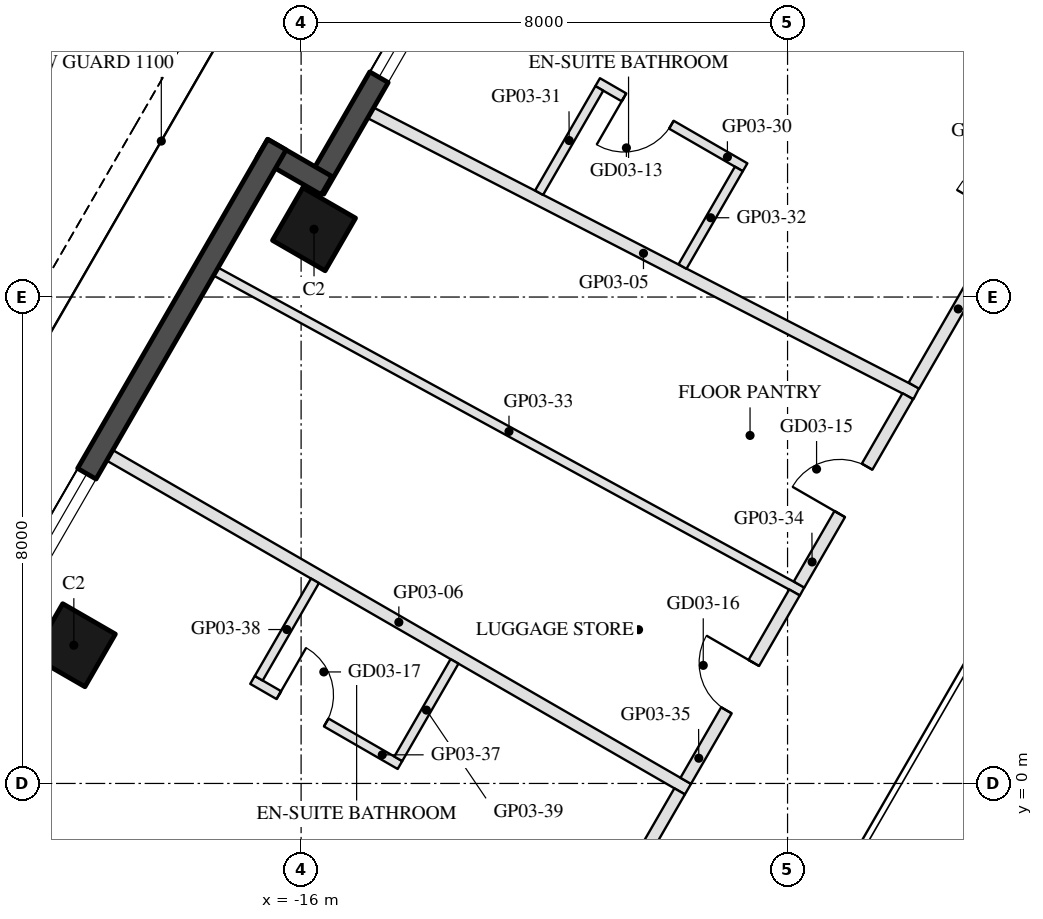
"""IFC4 building model, lengths in metres.
Left out: names, types, materials, properties, quantities, classifications, styles, units other than length and angle.
Written with IfcOpenShell. Run it as: python <this file> out.ifc"""

import sys

from ifc_helpers import new_model, si_unit, direction, frame, frame_2d, origin, origin_2d, place, context, subcontext, project, spatial, rectangle, hollow_rectangle, extrude, element, fill, save


model = new_model("IFC4")
c1 = context("Model", 3, precision=1e-05, world=origin(), true_north=direction((0.0, 1.0)))
c2 = subcontext(c1, "Body", "Model", "MODEL_VIEW")
j1 = project(units=[si_unit("LENGTHUNIT", "METRE"), si_unit("PLANEANGLEUNIT", "RADIAN")], contexts=[c1])
p1 = place(None, origin())
s1 = spatial("IfcSite", under=j1, at=p1, CompositionType="ELEMENT")
p2 = place(p1, origin())
s2 = spatial("IfcBuilding", under=s1, at=p2, CompositionType="ELEMENT")
p3 = place(p2, frame((0.0, 0.0, 65.0)))
s3 = spatial("IfcBuildingStorey", under=s2, at=p3, CompositionType="ELEMENT", Elevation=65.0)
for number, where, z_axis, x_axis in (
    (1, (-15.788, 9.115, 0.0), (0.0, 0.0, 1.0), (0.5, 0.866, 0.0)),
    (2, (-19.738, 2.273, 0.0), (0.0, 0.0, 1.0), (0.5, 0.866, 0.0)),
):
    element("IfcColumn", number, at=place(p3, frame(where, z_axis=z_axis, x_axis=x_axis)), inside=s3, PredefinedType="COLUMN", context=c2, shape_type="SweptSolid", body=[
        extrude(hollow_rectangle(XDim=1.0, YDim=1.0, WallThickness=0.045, at=origin_2d()), origin(), (0.0, 0.0, 1.0), 3.7),
    ])
p4 = place(p3, frame((-12.409, 15.617, 0.0), z_axis=(0.0, 0.0, 1.0), x_axis=(-0.500003597184, -0.866023326939, 0.0)))
e3 = element("IfcWall", 3, at=p4, inside=s3, PredefinedType="SOLIDWALL", context=c2, shape_type="SweptSolid", body=[
    extrude(rectangle(XDim=6.74, YDim=0.35, at=frame_2d((3.37, 0.0))), origin(), (0.0, 0.0, 1.0), 3.55),
])
p5 = place(p4, frame((0.32, 0.0, 0.3)))
e4 = element("IfcOpeningElement", 4, at=p5, cuts=e3, PredefinedType="OPENING", context=c2, shape_type="SweptSolid", body=[
    extrude(rectangle(XDim=2.0, YDim=2.65, at=frame_2d((1.0, 1.325))), frame((0.0, 0.185, 0.0), z_axis=(0.0, -1.0, 0.0), x_axis=(1.0, 0.0, 0.0)), (0.0, 0.0, 1.0), 0.37),
])
p6 = place(p4, frame((2.62, 0.0, 0.3)))
e5 = element("IfcOpeningElement", 5, at=p6, cuts=e3, PredefinedType="OPENING", context=c2, shape_type="SweptSolid", body=[
    extrude(rectangle(XDim=2.0, YDim=2.65, at=frame_2d((1.0, 1.325))), frame((0.0, 0.185, 0.0), z_axis=(0.0, -1.0, 0.0), x_axis=(1.0, 0.0, 0.0)), (0.0, 0.0, 1.0), 0.37),
])
p7 = place(p3, frame((-15.581, 9.833, 0.0), z_axis=(0.0, 0.0, 1.0), x_axis=(-0.866055662726, 0.499947586314, 0.0)))
e6 = element("IfcWall", 6, at=p7, inside=s3, PredefinedType="SOLIDWALL", context=c2, shape_type="SweptSolid", body=[
    extrude(rectangle(XDim=1.22, YDim=0.35, at=frame_2d((0.61, 0.0))), origin(), (0.0, 0.0, 1.0), 3.55),
])
p8 = place(p3, frame((-16.398, 10.507, 0.0), z_axis=(0.0, 0.0, 1.0), x_axis=(-0.499999142773, -0.866025898704, 0.0)))
e7 = element("IfcWall", 7, at=p8, inside=s3, PredefinedType="SOLIDWALL", context=c2, shape_type="SweptSolid", body=[
    extrude(rectangle(XDim=9.7, YDim=0.35, at=frame_2d((4.85, 0.0))), origin(), (0.0, 0.0, 1.0), 3.55),
])
p9 = place(p8, frame((6.25, 0.0, 0.3)))
e8 = element("IfcOpeningElement", 8, at=p9, cuts=e7, PredefinedType="OPENING", context=c2, shape_type="SweptSolid", body=[
    extrude(rectangle(XDim=1.6, YDim=2.65, at=frame_2d((0.8, 1.325))), frame((0.0, 0.185, 0.0), z_axis=(0.0, -1.0, 0.0), x_axis=(1.0, 0.0, 0.0)), (0.0, 0.0, 1.0), 0.37),
])
p10 = place(p3, frame((-14.856, 11.029, 0.0), z_axis=(0.0, 0.0, 1.0), x_axis=(0.889105841633, -0.457701652142, 0.0)))
e9 = element("IfcWall", 9, at=p10, inside=s3, PredefinedType="PARTITIONING", context=c2, shape_type="SweptSolid", body=[
    extrude(rectangle(XDim=10.092, YDim=0.2, at=frame_2d((5.046, 0.0))), origin(), (0.0, 0.0, 1.0), 2.96),
])
p11 = place(p3, frame((-19.147, 5.396, 0.0), z_axis=(0.0, 0.0, 1.0), x_axis=(0.866027479907, -0.499996404033, 0.0)))
e10 = element("IfcWall", 10, at=p11, inside=s3, PredefinedType="PARTITIONING", context=c2, shape_type="SweptSolid", body=[
    extrude(rectangle(XDim=10.98, YDim=0.2, at=frame_2d((5.49, 0.0))), origin(), (0.0, 0.0, 1.0), 2.96),
])
p12 = place(p3, frame((-5.922, 6.542, 0.0), z_axis=(0.0, 0.0, 1.0), x_axis=(0.499989401968, 0.866031522475, 0.0)))
e11 = element("IfcWall", 11, at=p12, inside=s3, PredefinedType="PARTITIONING", context=c2, shape_type="SweptSolid", body=[
    extrude(rectangle(XDim=7.283, YDim=0.2, at=frame_2d((3.642, 0.0))), origin(), (0.0, 0.0, 1.0), 2.95),
])
p13 = place(p12, frame((3.142, 0.0, 0.0)))
e12 = element("IfcOpeningElement", 12, at=p13, cuts=e11, PredefinedType="OPENING", context=c2, shape_type="SweptSolid", body=[
    extrude(rectangle(XDim=1.0, YDim=2.1, at=frame_2d((0.5, 1.05))), frame((0.0, 0.11, 0.0), z_axis=(0.0, -1.0, 0.0), x_axis=(1.0, 0.0, 0.0)), (0.0, 0.0, 1.0), 0.22),
])
p14 = place(p3, frame((-8.698, 10.134, 0.0), z_axis=(0.0, 0.0, 1.0), x_axis=(-0.866034573852, 0.49998411664, 0.0)))
e13 = element("IfcWall", 13, at=p14, inside=s3, PredefinedType="PARTITIONING", context=c2, shape_type="SweptSolid", body=[
    extrude(rectangle(XDim=2.8, YDim=0.15, at=frame_2d((1.4, 0.0))), origin(), (0.0, 0.0, 1.0), 3.55),
])
p15 = place(p14, frame((1.4, 0.0, 0.0)))
e14 = element("IfcOpeningElement", 14, at=p15, cuts=e13, PredefinedType="OPENING", context=c2, shape_type="SweptSolid", body=[
    extrude(rectangle(XDim=0.9, YDim=2.1, at=frame_2d((0.45, 1.05))), frame((0.0, 0.085, 0.0), z_axis=(0.0, -1.0, 0.0), x_axis=(1.0, 0.0, 0.0)), (0.0, 0.0, 1.0), 0.17),
])
p16 = place(p3, frame((-11.096, 11.432, 0.0), z_axis=(0.0, 0.0, 1.0), x_axis=(-0.500035331196, -0.866005004348, 0.0)))
e15 = element("IfcWall", 15, at=p16, inside=s3, PredefinedType="PARTITIONING", context=c2, shape_type="SweptSolid", body=[
    extrude(rectangle(XDim=1.981, YDim=0.15, at=frame_2d((0.991, 0.0))), origin(), (0.0, 0.0, 1.0), 2.95),
])
p17 = place(p3, frame((-8.801, 10.107, 0.0), z_axis=(0.0, 0.0, 1.0), x_axis=(-0.499992292652, -0.866029853578, 0.0)))
e16 = element("IfcWall", 16, at=p17, inside=s3, PredefinedType="PARTITIONING", context=c2, shape_type="SweptSolid", body=[
    extrude(rectangle(XDim=1.854, YDim=0.15, at=frame_2d((0.927, 0.0))), origin(), (0.0, 0.0, 1.0), 2.95),
])
p18 = place(p3, frame((-17.402, 8.419, 0.0), z_axis=(0.0, 0.0, 1.0), x_axis=(0.877831004422, -0.47897048727, 0.0)))
e17 = element("IfcWall", 17, at=p18, inside=s3, PredefinedType="PARTITIONING", context=c2, shape_type="SweptSolid", body=[
    extrude(rectangle(XDim=10.983, YDim=0.15, at=frame_2d((5.492, 0.0))), origin(), (0.0, 0.0, 1.0), 2.96),
])
p19 = place(p3, frame((-7.811, 3.271, 0.0), z_axis=(0.0, 0.0, 1.0), x_axis=(0.4999705729, 0.866042392862, 0.0)))
e18 = element("IfcWall", 18, at=p19, inside=s3, PredefinedType="PARTITIONING", context=c2, shape_type="SweptSolid", body=[
    extrude(rectangle(XDim=3.577, YDim=0.2, at=frame_2d((1.789, 0.0))), origin(), (0.0, 0.0, 1.0), 2.95),
])
p20 = place(p19, frame((1.339, 0.0, 0.0)))
e19 = element("IfcOpeningElement", 19, at=p20, cuts=e18, PredefinedType="OPENING", context=c2, shape_type="SweptSolid", body=[
    extrude(rectangle(XDim=0.9, YDim=2.1, at=frame_2d((0.45, 1.05))), frame((0.0, 0.11, 0.0), z_axis=(0.0, -1.0, 0.0), x_axis=(1.0, 0.0, 0.0)), (0.0, 0.0, 1.0), 0.22),
])
p21 = place(p3, frame((-9.675, 0.043, 0.0), z_axis=(0.0, 0.0, 1.0), x_axis=(0.500000124603, 0.866025331845, 0.0)))
e20 = element("IfcWall", 20, at=p21, inside=s3, PredefinedType="PARTITIONING", context=c2, shape_type="SweptSolid", body=[
    extrude(rectangle(XDim=3.577, YDim=0.2, at=frame_2d((1.789, 0.0))), origin(), (0.0, 0.0, 1.0), 2.95),
])
p22 = place(p21, frame((1.339, 0.0, 0.0)))
e21 = element("IfcOpeningElement", 21, at=p22, cuts=e20, PredefinedType="OPENING", context=c2, shape_type="SweptSolid", body=[
    extrude(rectangle(XDim=0.9, YDim=2.1, at=frame_2d((0.45, 1.05))), frame((0.0, 0.11, 0.0), z_axis=(0.0, -1.0, 0.0), x_axis=(1.0, 0.0, 0.0)), (0.0, 0.0, 1.0), 0.22),
])
p23 = place(p3, frame((-12.269, -4.45, 0.0), z_axis=(0.0, 0.0, 1.0), x_axis=(0.500013374061, 0.866017682129, 0.0)))
e22 = element("IfcWall", 22, at=p23, inside=s3, PredefinedType="PARTITIONING", context=c2, shape_type="SweptSolid", body=[
    extrude(rectangle(XDim=4.988, YDim=0.2, at=frame_2d((2.494, 0.0))), origin(), (0.0, 0.0, 1.0), 2.95),
])
p24 = place(p23, frame((1.994, 0.0, 0.0)))
e23 = element("IfcOpeningElement", 23, at=p24, cuts=e22, PredefinedType="OPENING", context=c2, shape_type="SweptSolid", body=[
    extrude(rectangle(XDim=1.0, YDim=2.1, at=frame_2d((0.5, 1.05))), frame((0.0, 0.11, 0.0), z_axis=(0.0, -1.0, 0.0), x_axis=(1.0, 0.0, 0.0)), (0.0, 0.0, 1.0), 0.22),
])
p25 = place(p3, frame((-16.799, 1.703, 0.0), z_axis=(0.0, 0.0, 1.0), x_axis=(0.865996816683, -0.500049511043, 0.0)))
e24 = element("IfcWall", 24, at=p25, inside=s3, PredefinedType="PARTITIONING", context=c2, shape_type="SweptSolid", body=[
    extrude(rectangle(XDim=2.8, YDim=0.15, at=frame_2d((1.4, 0.0))), origin(), (0.0, 0.0, 1.0), 3.55),
])
p26 = place(p25, frame((0.5, 0.0, 0.0)))
e25 = element("IfcOpeningElement", 25, at=p26, cuts=e24, PredefinedType="OPENING", context=c2, shape_type="SweptSolid", body=[
    extrude(rectangle(XDim=0.9, YDim=2.1, at=frame_2d((0.45, 1.05))), frame((0.0, 0.085, 0.0), z_axis=(0.0, -1.0, 0.0), x_axis=(1.0, 0.0, 0.0)), (0.0, 0.0, 1.0), 0.17),
])
p27 = place(p3, frame((-15.772, 3.333, 0.0), z_axis=(0.0, 0.0, 1.0), x_axis=(-0.499985172903, -0.866033964044, 0.0)))
e26 = element("IfcWall", 26, at=p27, inside=s3, PredefinedType="PARTITIONING", context=c2, shape_type="SweptSolid", body=[
    extrude(rectangle(XDim=1.85, YDim=0.15, at=frame_2d((0.925, 0.0))), origin(), (0.0, 0.0, 1.0), 3.55),
])
p28 = place(p3, frame((-13.477, 2.007, 0.0), z_axis=(0.0, 0.0, 1.0), x_axis=(-0.500042316284, -0.866000971088, 0.0)))
e27 = element("IfcWall", 27, at=p28, inside=s3, PredefinedType="PARTITIONING", context=c2, shape_type="SweptSolid", body=[
    extrude(rectangle(XDim=1.85, YDim=0.15, at=frame_2d((0.925, 0.0))), origin(), (0.0, 0.0, 1.0), 3.55),
])
p29 = place(p6, origin())
e28 = element("IfcWindow", 28, at=p29, inside=s3, PartitioningType="SINGLE_PANEL", PredefinedType="WINDOW", context=c2, shape_type="SweptSolid", body=[
    extrude(rectangle(XDim=2.0, YDim=2.65, at=frame_2d((1.0, 1.325))), frame((0.0, 0.03, 0.0), z_axis=(0.0, -1.0, 0.0), x_axis=(1.0, 0.0, 0.0)), (0.0, 0.0, 1.0), 0.06),
])
fill(e5, e28)
p30 = place(p9, origin())
e29 = element("IfcWindow", 29, at=p30, inside=s3, PartitioningType="SINGLE_PANEL", PredefinedType="WINDOW", context=c2, shape_type="SweptSolid", body=[
    extrude(rectangle(XDim=1.6, YDim=2.65, at=frame_2d((0.8, 1.325))), frame((0.0, 0.03, 0.0), z_axis=(0.0, -1.0, 0.0), x_axis=(1.0, 0.0, 0.0)), (0.0, 0.0, 1.0), 0.06),
])
fill(e8, e29)
p31 = place(p15, origin())
e30 = element("IfcDoor", 30, at=p31, inside=s3, OperationType="SINGLE_SWING_RIGHT", PredefinedType="DOOR", context=c2, shape_type="SweptSolid", body=[
    extrude(rectangle(XDim=0.9, YDim=2.1, at=frame_2d((0.45, 1.05))), frame((0.0, 0.025, 0.0), z_axis=(0.0, -1.0, 0.0), x_axis=(1.0, 0.0, 0.0)), (0.0, 0.0, 1.0), 0.05),
])
fill(e14, e30)
p32 = place(p20, origin())
e31 = element("IfcDoor", 31, at=p32, inside=s3, OperationType="SINGLE_SWING_LEFT", PredefinedType="DOOR", context=c2, shape_type="SweptSolid", body=[
    extrude(rectangle(XDim=0.9, YDim=2.1, at=frame_2d((0.45, 1.05))), frame((0.0, 0.025, 0.0), z_axis=(0.0, -1.0, 0.0), x_axis=(1.0, 0.0, 0.0)), (0.0, 0.0, 1.0), 0.05),
])
fill(e19, e31)
p33 = place(p22, origin())
e32 = element("IfcDoor", 32, at=p33, inside=s3, OperationType="SINGLE_SWING_RIGHT", PredefinedType="DOOR", context=c2, shape_type="SweptSolid", body=[
    extrude(rectangle(XDim=0.9, YDim=2.1, at=frame_2d((0.45, 1.05))), frame((0.0, 0.025, 0.0), z_axis=(0.0, -1.0, 0.0), x_axis=(1.0, 0.0, 0.0)), (0.0, 0.0, 1.0), 0.05),
])
fill(e21, e32)
p34 = place(p26, origin())
e33 = element("IfcDoor", 33, at=p34, inside=s3, OperationType="SINGLE_SWING_LEFT", PredefinedType="DOOR", context=c2, shape_type="SweptSolid", body=[
    extrude(rectangle(XDim=0.9, YDim=2.1, at=frame_2d((0.45, 1.05))), frame((0.0, 0.025, 0.0), z_axis=(0.0, -1.0, 0.0), x_axis=(1.0, 0.0, 0.0)), (0.0, 0.0, 1.0), 0.05),
])
fill(e25, e33)
save(model, sys.argv[1])
